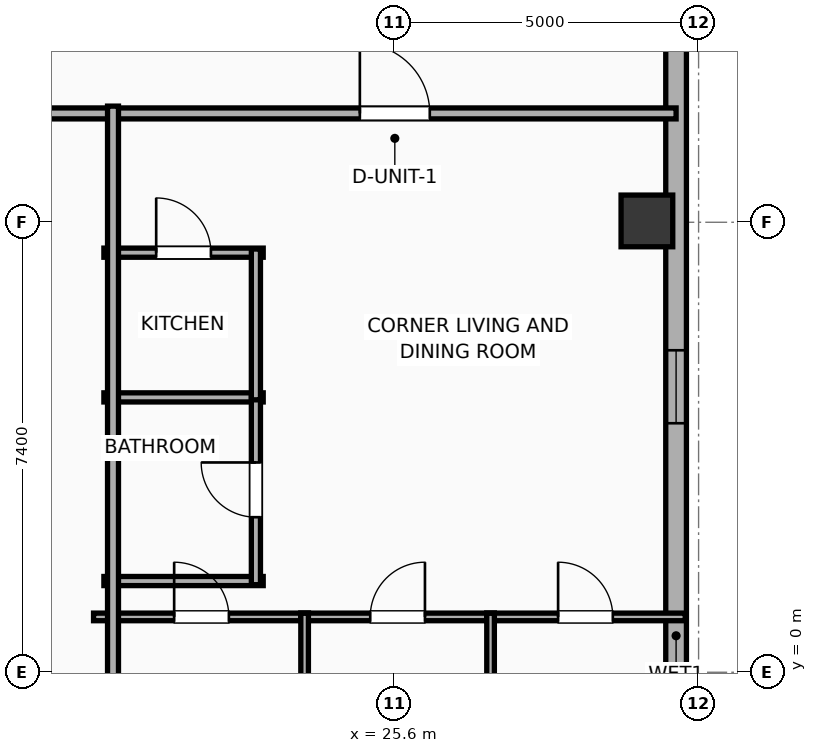
"""IFC4 building model, lengths in metres.
Left out: names, types, materials, properties, quantities, classifications, styles, units other than length and angle.
Written with IfcOpenShell. Run it as: python <this file> out.ifc"""

import sys

from ifc_helpers import new_model, si_unit, direction, frame, frame_2d, origin, origin_2d, place, context, subcontext, project, spatial, rectangle, hollow_rectangle, extrude, element, fill, save


model = new_model("IFC4")
c1 = context("Model", 3, precision=1e-05, world=origin(), true_north=direction((0.0, 1.0)))
c2 = subcontext(c1, "Body", "Model", "MODEL_VIEW")
j1 = project(units=[si_unit("LENGTHUNIT", "METRE"), si_unit("PLANEANGLEUNIT", "RADIAN")], contexts=[c1])
p1 = place(None, origin())
s1 = spatial("IfcSite", under=j1, at=p1, CompositionType="ELEMENT")
p2 = place(p1, origin())
s2 = spatial("IfcBuilding", under=s1, at=p2, CompositionType="ELEMENT")
p3 = place(p2, frame((0.0, 0.0, 215.8)))
s3 = spatial("IfcBuildingStorey", under=s2, at=p3, CompositionType="ELEMENT", Elevation=215.8)
p4 = place(p3, frame((29.75, 7.422, 0.0), z_axis=(0.0, 0.0, 1.0), x_axis=(1.0, 0.0, 0.0)))
e1 = element("IfcColumn", 1, at=p4, inside=s3, PredefinedType="COLUMN", context=c2, shape_type="SweptSolid", body=[
    extrude(hollow_rectangle(XDim=0.85, YDim=0.85, WallThickness=0.028, at=origin_2d()), origin(), (0.0, 0.0, 1.0), 3.9),
])
p5 = place(p3, frame((30.23, 16.583, 0.0), z_axis=(0.0, 0.0, 1.0), x_axis=(0.0, -1.0, 0.0)))
e2 = element("IfcWall", 2, at=p5, inside=s3, PredefinedType="ELEMENTEDWALL", context=c2, shape_type="SweptSolid", body=[
    extrude(rectangle(XDim=31.967, YDim=0.34, at=frame_2d((15.983, 0.0))), origin(), (0.0, 0.0, 1.0), 3.65),
])
p6 = place(p5, frame((30.132, 0.0, 0.75)))
e3 = element("IfcOpeningElement", 3, at=p6, cuts=e2, PredefinedType="OPENING", context=c2, shape_type="SweptSolid", body=[
    extrude(rectangle(XDim=1.2, YDim=2.05, at=frame_2d((0.6, 1.025))), frame((0.0, 0.18, 0.0), z_axis=(0.0, -1.0, 0.0), x_axis=(1.0, 0.0, 0.0)), (0.0, 0.0, 1.0), 0.36),
])
p7 = place(p5, frame((11.288, 0.0, 0.75)))
e4 = element("IfcOpeningElement", 4, at=p7, cuts=e2, PredefinedType="OPENING", context=c2, shape_type="SweptSolid", body=[
    extrude(rectangle(XDim=1.2, YDim=2.05, at=frame_2d((0.6, 1.025))), frame((0.0, 0.18, 0.0), z_axis=(0.0, -1.0, 0.0), x_axis=(1.0, 0.0, 0.0)), (0.0, 0.0, 1.0), 0.36),
])
p8 = place(p5, frame((20.538, 0.0, 0.75)))
e5 = element("IfcOpeningElement", 5, at=p8, cuts=e2, PredefinedType="OPENING", context=c2, shape_type="SweptSolid", body=[
    extrude(rectangle(XDim=1.2, YDim=2.05, at=frame_2d((0.6, 1.025))), frame((0.0, 0.18, 0.0), z_axis=(0.0, -1.0, 0.0), x_axis=(1.0, 0.0, 0.0)), (0.0, 0.0, 1.0), 0.36),
])
p9 = place(p3, frame((9.88, 9.19, 0.0), z_axis=(0.0, 0.0, 1.0), x_axis=(1.0, 0.0, 0.0)))
e6 = element("IfcWall", 6, at=p9, inside=s3, PredefinedType="PARTITIONING", context=c2, shape_type="SweptSolid", body=[
    extrude(rectangle(XDim=20.35, YDim=0.18, at=frame_2d((10.175, 0.0))), origin(), (0.0, 0.0, 1.0), 3.65),
])
p10 = place(p9, frame((15.149, 0.0, 0.0)))
e7 = element("IfcOpeningElement", 7, at=p10, cuts=e6, PredefinedType="OPENING", context=c2, shape_type="SweptSolid", body=[
    extrude(rectangle(XDim=1.15, YDim=2.05, at=frame_2d((0.575, 1.025))), frame((0.0, 0.1, 0.0), z_axis=(0.0, -1.0, 0.0), x_axis=(1.0, 0.0, 0.0)), (0.0, 0.0, 1.0), 0.2),
])
p11 = place(p3, frame((20.82, 6.9, 0.0), z_axis=(0.0, 0.0, 1.0), x_axis=(1.0, 0.0, 0.0)))
e8 = element("IfcWall", 8, at=p11, inside=s3, PredefinedType="PLUMBINGWALL", context=c2, shape_type="SweptSolid", body=[
    extrude(rectangle(XDim=2.62, YDim=0.15, at=frame_2d((1.31, 0.0))), origin(), (0.0, 0.0, 1.0), 3.65),
])
p12 = place(p11, frame((0.86, 0.0, 0.0)))
e9 = element("IfcOpeningElement", 9, at=p12, cuts=e8, PredefinedType="OPENING", context=c2, shape_type="SweptSolid", body=[
    extrude(rectangle(XDim=0.9, YDim=2.05, at=frame_2d((0.45, 1.025))), frame((0.0, 0.085, 0.0), z_axis=(0.0, -1.0, 0.0), x_axis=(1.0, 0.0, 0.0)), (0.0, 0.0, 1.0), 0.17),
])
for number, where, z_axis, x_axis in (
    (10, (20.82, 4.52, 0.0), (0.0, 0.0, 1.0), (1.0, 0.0, 0.0)),
    (11, (20.82, 1.5, 0.0), (0.0, 0.0, 1.0), (1.0, 0.0, 0.0)),
):
    element("IfcWall", number, at=place(p3, frame(where, z_axis=z_axis, x_axis=x_axis)), inside=s3, PredefinedType="PLUMBINGWALL", context=c2, shape_type="SweptSolid", body=[
        extrude(rectangle(XDim=2.62, YDim=0.15, at=frame_2d((1.31, 0.0))), origin(), (0.0, 0.0, 1.0), 3.65),
    ])
p13 = place(p3, frame((23.32, 1.44, 0.0), z_axis=(0.0, 0.0, 1.0), x_axis=(0.0, 1.0, 0.0)))
e12 = element("IfcWall", 12, at=p13, inside=s3, PredefinedType="PLUMBINGWALL", context=c2, shape_type="SweptSolid", body=[
    extrude(rectangle(XDim=3.12, YDim=0.15, at=frame_2d((1.56, 0.0))), origin(), (0.0, 0.0, 1.0), 3.65),
])
p14 = place(p13, frame((1.11, 0.0, 0.0)))
e13 = element("IfcOpeningElement", 13, at=p14, cuts=e12, PredefinedType="OPENING", context=c2, shape_type="SweptSolid", body=[
    extrude(rectangle(XDim=0.9, YDim=2.05, at=frame_2d((0.45, 1.025))), frame((0.0, 0.085, 0.0), z_axis=(0.0, -1.0, 0.0), x_axis=(1.0, 0.0, 0.0)), (0.0, 0.0, 1.0), 0.17),
])
p15 = place(p3, frame((23.32, 4.48, 0.0), z_axis=(0.0, 0.0, 1.0), x_axis=(0.0, 1.0, 0.0)))
e14 = element("IfcWall", 14, at=p15, inside=s3, PredefinedType="PLUMBINGWALL", context=c2, shape_type="SweptSolid", body=[
    extrude(rectangle(XDim=2.48, YDim=0.15, at=frame_2d((1.24, 0.0))), origin(), (0.0, 0.0, 1.0), 3.65),
])
p16 = place(p3, frame((20.65, 0.91, 0.0), z_axis=(0.0, 0.0, 1.0), x_axis=(1.0, 0.0, 0.0)))
e15 = element("IfcWall", 15, at=p16, inside=s3, PredefinedType="PARTITIONING", context=c2, shape_type="SweptSolid", body=[
    extrude(rectangle(XDim=3.534, YDim=0.125, at=frame_2d((1.767, 0.0))), origin(), (0.0, 0.0, 1.0), 3.65),
])
p17 = place(p16, frame((1.325, 0.0, 0.0)))
e16 = element("IfcOpeningElement", 16, at=p17, cuts=e15, PredefinedType="OPENING", context=c2, shape_type="SweptSolid", body=[
    extrude(rectangle(XDim=0.9, YDim=2.05, at=frame_2d((0.45, 1.025))), frame((0.0, 0.073, 0.0), z_axis=(0.0, -1.0, 0.0), x_axis=(1.0, 0.0, 0.0)), (0.0, 0.0, 1.0), 0.145),
])
p18 = place(p3, frame((24.059, 0.91, 0.0), z_axis=(0.0, 0.0, 1.0), x_axis=(1.0, 0.0, 0.0)))
e17 = element("IfcWall", 17, at=p18, inside=s3, PredefinedType="PARTITIONING", context=c2, shape_type="SweptSolid", body=[
    extrude(rectangle(XDim=3.183, YDim=0.125, at=frame_2d((1.591, 0.0))), origin(), (0.0, 0.0, 1.0), 3.65),
])
p19 = place(p18, frame((1.142, 0.0, 0.0)))
e18 = element("IfcOpeningElement", 18, at=p19, cuts=e17, PredefinedType="OPENING", context=c2, shape_type="SweptSolid", body=[
    extrude(rectangle(XDim=0.9, YDim=2.05, at=frame_2d((0.45, 1.025))), frame((0.0, 0.073, 0.0), z_axis=(0.0, -1.0, 0.0), x_axis=(1.0, 0.0, 0.0)), (0.0, 0.0, 1.0), 0.145),
])
p20 = place(p3, frame((27.116, 0.91, 0.0), z_axis=(0.0, 0.0, 1.0), x_axis=(1.0, 0.0, 0.0)))
e19 = element("IfcWall", 19, at=p20, inside=s3, PredefinedType="PARTITIONING", context=c2, shape_type="SweptSolid", body=[
    extrude(rectangle(XDim=3.263, YDim=0.125, at=frame_2d((1.632, 0.0))), origin(), (0.0, 0.0, 1.0), 3.65),
])
p21 = place(p20, frame((1.173, 0.0, 0.0)))
e20 = element("IfcOpeningElement", 20, at=p21, cuts=e19, PredefinedType="OPENING", context=c2, shape_type="SweptSolid", body=[
    extrude(rectangle(XDim=0.9, YDim=2.05, at=frame_2d((0.45, 1.025))), frame((0.0, 0.073, 0.0), z_axis=(0.0, -1.0, 0.0), x_axis=(1.0, 0.0, 0.0)), (0.0, 0.0, 1.0), 0.145),
])
for number, where, z_axis, x_axis in (
    (21, (27.179, -9.51, 0.0), (0.0, 0.0, 1.0), (0.0, 1.0, 0.0)),
    (22, (24.121, -9.51, 0.0), (0.0, 0.0, 1.0), (0.0, 1.0, 0.0)),
):
    element("IfcWall", number, at=place(p3, frame(where, z_axis=z_axis, x_axis=x_axis)), inside=s3, PredefinedType="PARTITIONING", context=c2, shape_type="SweptSolid", body=[
        extrude(rectangle(XDim=10.48, YDim=0.125, at=frame_2d((5.24, 0.0))), origin(), (0.0, 0.0, 1.0), 3.65),
    ])
p22 = place(p3, frame((20.97, -9.31, 0.0), z_axis=(0.0, 0.0, 1.0), x_axis=(0.0, 1.0, 0.0)))
e23 = element("IfcWall", 23, at=p22, inside=s3, PredefinedType="PARTITIONING", context=c2, shape_type="SweptSolid", body=[
    extrude(rectangle(XDim=18.62, YDim=0.18, at=frame_2d((9.31, 0.0))), origin(), (0.0, 0.0, 1.0), 3.65),
])
p23 = place(p7, origin())
e24 = element("IfcWindow", 24, at=p23, inside=s3, PartitioningType="SINGLE_PANEL", PredefinedType="WINDOW", context=c2, shape_type="SweptSolid", body=[
    extrude(rectangle(XDim=1.2, YDim=2.05, at=frame_2d((0.6, 1.025))), frame((0.0, 0.03, 0.0), z_axis=(0.0, -1.0, 0.0), x_axis=(1.0, 0.0, 0.0)), (0.0, 0.0, 1.0), 0.06),
])
fill(e4, e24)
p24 = place(p10, origin())
e25 = element("IfcDoor", 25, at=p24, inside=s3, OperationType="SINGLE_SWING_LEFT", PredefinedType="DOOR", context=c2, shape_type="SweptSolid", body=[
    extrude(rectangle(XDim=1.15, YDim=2.05, at=frame_2d((0.575, 1.025))), frame((0.0, 0.025, 0.0), z_axis=(0.0, -1.0, 0.0), x_axis=(1.0, 0.0, 0.0)), (0.0, 0.0, 1.0), 0.05),
])
fill(e7, e25)
p25 = place(p12, origin())
e26 = element("IfcDoor", 26, at=p25, inside=s3, OperationType="SINGLE_SWING_LEFT", PredefinedType="DOOR", context=c2, shape_type="SweptSolid", body=[
    extrude(rectangle(XDim=0.9, YDim=2.05, at=frame_2d((0.45, 1.025))), frame((0.0, 0.025, 0.0), z_axis=(0.0, -1.0, 0.0), x_axis=(1.0, 0.0, 0.0)), (0.0, 0.0, 1.0), 0.05),
])
fill(e9, e26)
p26 = place(p14, origin())
e27 = element("IfcDoor", 27, at=p26, inside=s3, OperationType="SINGLE_SWING_RIGHT", PredefinedType="DOOR", context=c2, shape_type="SweptSolid", body=[
    extrude(rectangle(XDim=0.9, YDim=2.05, at=frame_2d((0.45, 1.025))), frame((0.0, 0.025, 0.0), z_axis=(0.0, -1.0, 0.0), x_axis=(1.0, 0.0, 0.0)), (0.0, 0.0, 1.0), 0.05),
])
fill(e13, e27)
p27 = place(p17, origin())
e28 = element("IfcDoor", 28, at=p27, inside=s3, OperationType="SINGLE_SWING_LEFT", PredefinedType="DOOR", context=c2, shape_type="SweptSolid", body=[
    extrude(rectangle(XDim=0.9, YDim=2.05, at=frame_2d((0.45, 1.025))), frame((0.0, 0.025, 0.0), z_axis=(0.0, -1.0, 0.0), x_axis=(1.0, 0.0, 0.0)), (0.0, 0.0, 1.0), 0.05),
])
fill(e16, e28)
p28 = place(p19, origin())
e29 = element("IfcDoor", 29, at=p28, inside=s3, OperationType="SINGLE_SWING_RIGHT", PredefinedType="DOOR", context=c2, shape_type="SweptSolid", body=[
    extrude(rectangle(XDim=0.9, YDim=2.05, at=frame_2d((0.45, 1.025))), frame((0.0, 0.025, 0.0), z_axis=(0.0, -1.0, 0.0), x_axis=(1.0, 0.0, 0.0)), (0.0, 0.0, 1.0), 0.05),
])
fill(e18, e29)
p29 = place(p21, origin())
e30 = element("IfcDoor", 30, at=p29, inside=s3, OperationType="SINGLE_SWING_LEFT", PredefinedType="DOOR", context=c2, shape_type="SweptSolid", body=[
    extrude(rectangle(XDim=0.9, YDim=2.05, at=frame_2d((0.45, 1.025))), frame((0.0, 0.025, 0.0), z_axis=(0.0, -1.0, 0.0), x_axis=(1.0, 0.0, 0.0)), (0.0, 0.0, 1.0), 0.05),
])
fill(e20, e30)
save(model, sys.argv[1])
